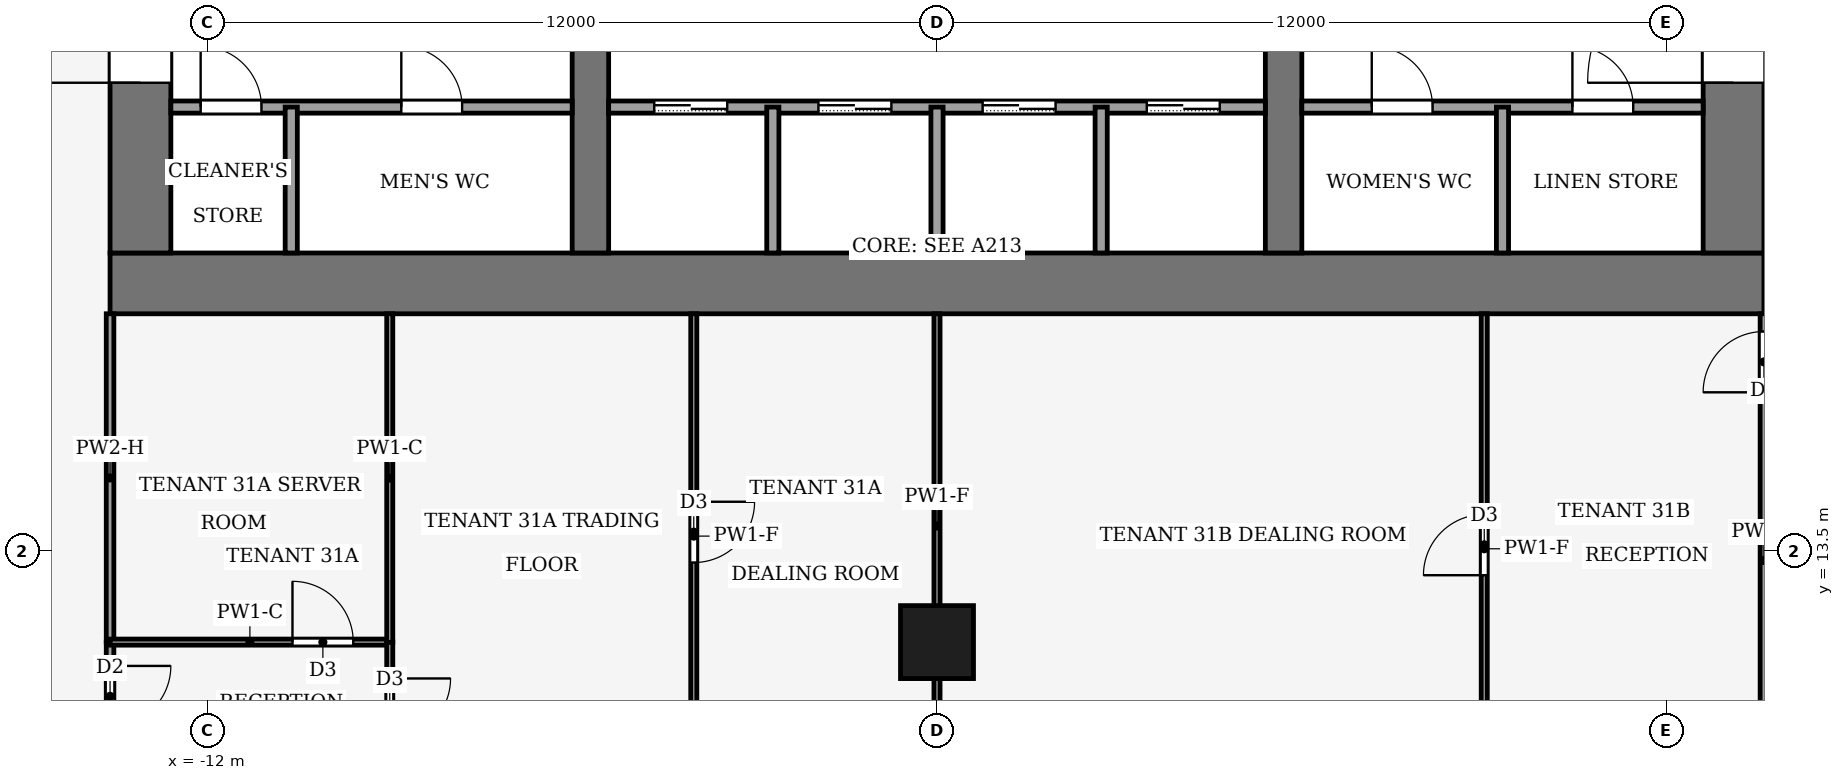
"""IFC4 building model, lengths in metres.
Left out: names, types, materials, properties, quantities, classifications, styles, units other than length and angle.
Written with IfcOpenShell. Run it as: python <this file> out.ifc"""

import sys

from ifc_helpers import new_model, si_unit, direction, frame, frame_2d, origin, origin_2d, place, context, subcontext, project, spatial, rectangle, hollow_rectangle, extrude, element, fill, save


model = new_model("IFC4")
c1 = context("Model", 3, precision=1e-05, world=origin(), true_north=direction((0.0, 1.0)))
c2 = subcontext(c1, "Body", "Model", "MODEL_VIEW")
j1 = project(units=[si_unit("LENGTHUNIT", "METRE"), si_unit("PLANEANGLEUNIT", "RADIAN")], contexts=[c1])
p1 = place(None, origin())
s1 = spatial("IfcSite", under=j1, at=p1, CompositionType="ELEMENT")
p2 = place(p1, origin())
s2 = spatial("IfcBuilding", under=s1, at=p2, CompositionType="ELEMENT")
p3 = place(p2, frame((0.0, 0.0, 138.0)))
s3 = spatial("IfcBuildingStorey", under=s2, at=p3, CompositionType="ELEMENT", Elevation=138.0)
p4 = place(p3, frame((-13.6, 17.9, -0.13), z_axis=(0.0, 0.0, 1.0), x_axis=(1.0, 0.0, 0.0)))
e1 = element("IfcWall", 1, at=p4, inside=s3, PredefinedType="SHEAR", context=c2, shape_type="SweptSolid", body=[
    extrude(rectangle(XDim=27.2, YDim=1.0, at=frame_2d((13.6, 0.0))), origin(), (0.0, 0.0, 1.0), 4.0),
])
p5 = place(p3, frame((-13.1, 18.4, -0.13), z_axis=(0.0, 0.0, 1.0), x_axis=(0.0, 1.0, 0.0)))
e2 = element("IfcWall", 2, at=p5, inside=s3, PredefinedType="SHEAR", context=c2, shape_type="SweptSolid", body=[
    extrude(rectangle(XDim=19.2, YDim=1.0, at=frame_2d((9.6, 0.0))), origin(), (0.0, 0.0, 1.0), 4.0),
])
p6 = place(p5, frame((2.8, 0.0, 0.13)))
e3 = element("IfcOpeningElement", 3, at=p6, cuts=e2, PredefinedType="OPENING", context=c2, shape_type="SweptSolid", body=[
    extrude(rectangle(XDim=2.4, YDim=2.4, at=frame_2d((1.2, 1.2))), frame((0.0, 0.51, 0.0), z_axis=(0.0, -1.0, 0.0), x_axis=(1.0, 0.0, 0.0)), (0.0, 0.0, 1.0), 1.02),
])
p7 = place(p5, frame((13.4, 0.0, 0.13)))
e4 = element("IfcOpeningElement", 4, at=p7, cuts=e2, PredefinedType="OPENING", context=c2, shape_type="SweptSolid", body=[
    extrude(rectangle(XDim=1.4, YDim=2.2, at=frame_2d((0.7, 1.1))), frame((0.0, 0.51, 0.0), z_axis=(0.0, -1.0, 0.0), x_axis=(1.0, 0.0, 0.0)), (0.0, 0.0, 1.0), 1.02),
])
p8 = place(p3, frame((13.1, 18.4, -0.13), z_axis=(0.0, 0.0, 1.0), x_axis=(0.0, 1.0, 0.0)))
e5 = element("IfcWall", 5, at=p8, inside=s3, PredefinedType="SHEAR", context=c2, shape_type="SweptSolid", body=[
    extrude(rectangle(XDim=19.2, YDim=1.0, at=frame_2d((9.6, 0.0))), origin(), (0.0, 0.0, 1.0), 4.0),
])
p9 = place(p8, frame((2.8, 0.0, 0.13)))
e6 = element("IfcOpeningElement", 6, at=p9, cuts=e5, PredefinedType="OPENING", context=c2, shape_type="SweptSolid", body=[
    extrude(rectangle(XDim=2.4, YDim=2.4, at=frame_2d((1.2, 1.2))), frame((0.0, 0.51, 0.0), z_axis=(0.0, -1.0, 0.0), x_axis=(1.0, 0.0, 0.0)), (0.0, 0.0, 1.0), 1.02),
])
p10 = place(p8, frame((13.3, 0.0, 0.13)))
e7 = element("IfcOpeningElement", 7, at=p10, cuts=e5, PredefinedType="OPENING", context=c2, shape_type="SweptSolid", body=[
    extrude(rectangle(XDim=2.4, YDim=2.4, at=frame_2d((1.2, 1.2))), frame((0.0, 0.51, 0.0), z_axis=(0.0, -1.0, 0.0), x_axis=(1.0, 0.0, 0.0)), (0.0, 0.0, 1.0), 1.02),
])
p11 = place(p3, frame((-5.7, 18.4, -0.13), z_axis=(0.0, 0.0, 1.0), x_axis=(0.0, 1.0, 0.0)))
e8 = element("IfcWall", 8, at=p11, inside=s3, PredefinedType="SHEAR", context=c2, shape_type="SweptSolid", body=[
    extrude(rectangle(XDim=19.2, YDim=0.6, at=frame_2d((9.6, 0.0))), origin(), (0.0, 0.0, 1.0), 4.0),
])
p12 = place(p11, frame((8.35, 0.0, 0.13)))
e9 = element("IfcOpeningElement", 9, at=p12, cuts=e8, PredefinedType="OPENING", context=c2, shape_type="SweptSolid", body=[
    extrude(rectangle(XDim=0.9, YDim=2.1, at=frame_2d((0.45, 1.05))), frame((0.0, 0.31, 0.0), z_axis=(0.0, -1.0, 0.0), x_axis=(1.0, 0.0, 0.0)), (0.0, 0.0, 1.0), 0.62),
])
p13 = place(p3, frame((5.7, 18.4, -0.13), z_axis=(0.0, 0.0, 1.0), x_axis=(0.0, 1.0, 0.0)))
e10 = element("IfcWall", 10, at=p13, inside=s3, PredefinedType="SHEAR", context=c2, shape_type="SweptSolid", body=[
    extrude(rectangle(XDim=19.2, YDim=0.6, at=frame_2d((9.6, 0.0))), origin(), (0.0, 0.0, 1.0), 4.0),
])
p14 = place(p13, frame((13.3, 0.0, 0.13)))
e11 = element("IfcOpeningElement", 11, at=p14, cuts=e10, PredefinedType="OPENING", context=c2, shape_type="SweptSolid", body=[
    extrude(rectangle(XDim=2.4, YDim=2.4, at=frame_2d((1.2, 1.2))), frame((0.0, 0.31, 0.0), z_axis=(0.0, -1.0, 0.0), x_axis=(1.0, 0.0, 0.0)), (0.0, 0.0, 1.0), 0.62),
])
p15 = place(p3, frame((0.0, 12.0, 0.0), z_axis=(0.0, 0.0, 1.0), x_axis=(1.0, 0.0, 0.0)))
e12 = element("IfcColumn", 12, at=p15, inside=s3, PredefinedType="COLUMN", context=c2, shape_type="SweptSolid", body=[
    extrude(hollow_rectangle(XDim=1.2, YDim=1.2, WallThickness=0.07, at=origin_2d()), origin(), (0.0, 0.0, 1.0), 4.0),
])
p16 = place(p3, frame((-12.6, 20.8, 0.0), z_axis=(0.0, 0.0, 1.0), x_axis=(1.0, 0.0, 0.0)))
e13 = element("IfcWall", 13, at=p16, inside=s3, PredefinedType="PARTITIONING", context=c2, shape_type="SweptSolid", body=[
    extrude(rectangle(XDim=6.6, YDim=0.2, at=frame_2d((3.3, 0.0))), origin(), (0.0, 0.0, 1.0), 3.87),
])
p17 = place(p16, frame((0.49, 0.0, 0.0)))
e14 = element("IfcOpeningElement", 14, at=p17, cuts=e13, PredefinedType="OPENING", context=c2, shape_type="SweptSolid", body=[
    extrude(rectangle(XDim=1.0, YDim=2.1, at=frame_2d((0.5, 1.05))), frame((0.0, 0.11, 0.0), z_axis=(0.0, -1.0, 0.0), x_axis=(1.0, 0.0, 0.0)), (0.0, 0.0, 1.0), 0.22),
])
p18 = place(p16, frame((3.79, 0.0, 0.0)))
e15 = element("IfcOpeningElement", 15, at=p18, cuts=e13, PredefinedType="OPENING", context=c2, shape_type="SweptSolid", body=[
    extrude(rectangle(XDim=1.0, YDim=2.1, at=frame_2d((0.5, 1.05))), frame((0.0, 0.11, 0.0), z_axis=(0.0, -1.0, 0.0), x_axis=(1.0, 0.0, 0.0)), (0.0, 0.0, 1.0), 0.22),
])
p19 = place(p3, frame((-5.4, 20.8, 0.0), z_axis=(0.0, 0.0, 1.0), x_axis=(1.0, 0.0, 0.0)))
e16 = element("IfcWall", 16, at=p19, inside=s3, PredefinedType="PARTITIONING", context=c2, shape_type="SweptSolid", body=[
    extrude(rectangle(XDim=10.8, YDim=0.2, at=frame_2d((5.4, 0.0))), origin(), (0.0, 0.0, 1.0), 3.87),
])
p20 = place(p19, frame((0.75, 0.0, 0.0)))
e17 = element("IfcOpeningElement", 17, at=p20, cuts=e16, PredefinedType="OPENING", context=c2, shape_type="SweptSolid", body=[
    extrude(rectangle(XDim=1.2, YDim=2.2, at=frame_2d((0.6, 1.1))), frame((0.0, 0.11, 0.0), z_axis=(0.0, -1.0, 0.0), x_axis=(1.0, 0.0, 0.0)), (0.0, 0.0, 1.0), 0.22),
])
p21 = place(p19, frame((3.45, 0.0, 0.0)))
e18 = element("IfcOpeningElement", 18, at=p21, cuts=e16, PredefinedType="OPENING", context=c2, shape_type="SweptSolid", body=[
    extrude(rectangle(XDim=1.2, YDim=2.2, at=frame_2d((0.6, 1.1))), frame((0.0, 0.11, 0.0), z_axis=(0.0, -1.0, 0.0), x_axis=(1.0, 0.0, 0.0)), (0.0, 0.0, 1.0), 0.22),
])
p22 = place(p19, frame((6.15, 0.0, 0.0)))
e19 = element("IfcOpeningElement", 19, at=p22, cuts=e16, PredefinedType="OPENING", context=c2, shape_type="SweptSolid", body=[
    extrude(rectangle(XDim=1.2, YDim=2.2, at=frame_2d((0.6, 1.1))), frame((0.0, 0.11, 0.0), z_axis=(0.0, -1.0, 0.0), x_axis=(1.0, 0.0, 0.0)), (0.0, 0.0, 1.0), 0.22),
])
p23 = place(p19, frame((8.85, 0.0, 0.0)))
e20 = element("IfcOpeningElement", 20, at=p23, cuts=e16, PredefinedType="OPENING", context=c2, shape_type="SweptSolid", body=[
    extrude(rectangle(XDim=1.2, YDim=2.2, at=frame_2d((0.6, 1.1))), frame((0.0, 0.11, 0.0), z_axis=(0.0, -1.0, 0.0), x_axis=(1.0, 0.0, 0.0)), (0.0, 0.0, 1.0), 0.22),
])
p24 = place(p3, frame((6.0, 20.8, 0.0), z_axis=(0.0, 0.0, 1.0), x_axis=(1.0, 0.0, 0.0)))
e21 = element("IfcWall", 21, at=p24, inside=s3, PredefinedType="PARTITIONING", context=c2, shape_type="SweptSolid", body=[
    extrude(rectangle(XDim=6.6, YDim=0.2, at=frame_2d((3.3, 0.0))), origin(), (0.0, 0.0, 1.0), 3.87),
])
p25 = place(p24, frame((1.15, 0.0, 0.0)))
e22 = element("IfcOpeningElement", 22, at=p25, cuts=e21, PredefinedType="OPENING", context=c2, shape_type="SweptSolid", body=[
    extrude(rectangle(XDim=1.0, YDim=2.1, at=frame_2d((0.5, 1.05))), frame((0.0, 0.11, 0.0), z_axis=(0.0, -1.0, 0.0), x_axis=(1.0, 0.0, 0.0)), (0.0, 0.0, 1.0), 0.22),
])
p26 = place(p24, frame((4.45, 0.0, 0.0)))
e23 = element("IfcOpeningElement", 23, at=p26, cuts=e21, PredefinedType="OPENING", context=c2, shape_type="SweptSolid", body=[
    extrude(rectangle(XDim=1.0, YDim=2.1, at=frame_2d((0.5, 1.05))), frame((0.0, 0.11, 0.0), z_axis=(0.0, -1.0, 0.0), x_axis=(1.0, 0.0, 0.0)), (0.0, 0.0, 1.0), 0.22),
])
for number, where, z_axis, x_axis in (
    (24, (-10.62, 18.4, 0.0), (0.0, 0.0, 1.0), (0.0, 1.0, 0.0)),
    (25, (-2.7, 18.4, 0.0), (0.0, 0.0, 1.0), (0.0, 1.0, 0.0)),
    (26, (0.0, 18.4, 0.0), (0.0, 0.0, 1.0), (0.0, 1.0, 0.0)),
    (27, (2.7, 18.4, 0.0), (0.0, 0.0, 1.0), (0.0, 1.0, 0.0)),
    (28, (9.3, 18.4, 0.0), (0.0, 0.0, 1.0), (0.0, 1.0, 0.0)),
):
    element("IfcWall", number, at=place(p3, frame(where, z_axis=z_axis, x_axis=x_axis)), inside=s3, PredefinedType="PARTITIONING", context=c2, shape_type="SweptSolid", body=[
        extrude(rectangle(XDim=2.4, YDim=0.2, at=frame_2d((1.2, 0.0))), origin(), (0.0, 0.0, 1.0), 3.87),
    ])
p27 = place(p3, frame((-13.6, 12.0, 0.0), z_axis=(0.0, 0.0, 1.0), x_axis=(0.0, -1.0, 0.0)))
e29 = element("IfcWall", 29, at=p27, inside=s3, PredefinedType="PARTITIONING", context=c2, shape_type="SweptSolid", body=[
    extrude(rectangle(XDim=2.713, YDim=0.125, at=frame_2d((1.357, 0.0))), origin(), (0.0, 0.0, 1.0), 3.04),
])
p28 = place(p27, frame((0.392, 0.0, 0.0)))
e30 = element("IfcOpeningElement", 30, at=p28, cuts=e29, PredefinedType="OPENING", context=c2, shape_type="SweptSolid", body=[
    extrude(rectangle(XDim=1.0, YDim=2.1, at=frame_2d((0.5, 1.05))), frame((0.0, 0.073, 0.0), z_axis=(0.0, -1.0, 0.0), x_axis=(1.0, 0.0, 0.0)), (0.0, 0.0, 1.0), 0.145),
])
p29 = place(p3, frame((-13.6, 12.0, 0.0), z_axis=(0.0, 0.0, 1.0), x_axis=(0.0, 1.0, 0.0)))
e31 = element("IfcWall", 31, at=p29, inside=s3, PredefinedType="PARTITIONING", context=c2, shape_type="SweptSolid", body=[
    extrude(rectangle(XDim=5.4, YDim=0.125, at=frame_2d((2.7, 0.0))), origin(), (0.0, 0.0, 1.0), 3.14),
])
p30 = place(p3, frame((13.6, 9.287, 0.0), z_axis=(0.0, 0.0, 1.0), x_axis=(0.0, 1.0, 0.0)))
e32 = element("IfcWall", 32, at=p30, inside=s3, PredefinedType="PARTITIONING", context=c2, shape_type="SweptSolid", body=[
    extrude(rectangle(XDim=8.113, YDim=0.125, at=frame_2d((4.057, 0.0))), origin(), (0.0, 0.0, 1.0), 3.04),
])
p31 = place(p30, frame((6.822, 0.0, 0.0)))
e33 = element("IfcOpeningElement", 33, at=p31, cuts=e32, PredefinedType="OPENING", context=c2, shape_type="SweptSolid", body=[
    extrude(rectangle(XDim=1.0, YDim=2.1, at=frame_2d((0.5, 1.05))), frame((0.0, 0.073, 0.0), z_axis=(0.0, -1.0, 0.0), x_axis=(1.0, 0.0, 0.0)), (0.0, 0.0, 1.0), 0.145),
])
p32 = place(p3, frame((-13.6, 12.0, 0.0), z_axis=(0.0, 0.0, 1.0), x_axis=(1.0, 0.0, 0.0)))
e34 = element("IfcWall", 34, at=p32, inside=s3, PredefinedType="PARTITIONING", context=c2, shape_type="SweptSolid", body=[
    extrude(rectangle(XDim=4.6, YDim=0.1, at=frame_2d((2.3, 0.0))), origin(), (0.0, 0.0, 1.0), 3.87),
])
p33 = place(p32, frame((3.0, 0.0, 0.0)))
e35 = element("IfcOpeningElement", 35, at=p33, cuts=e34, PredefinedType="OPENING", context=c2, shape_type="SweptSolid", body=[
    extrude(rectangle(XDim=1.0, YDim=2.1, at=frame_2d((0.5, 1.05))), frame((0.0, 0.06, 0.0), z_axis=(0.0, -1.0, 0.0), x_axis=(1.0, 0.0, 0.0)), (0.0, 0.0, 1.0), 0.12),
])
p34 = place(p3, frame((-9.0, 12.004, 0.0), z_axis=(0.0, 0.0, 1.0), x_axis=(0.0, -1.0, 0.0)))
e36 = element("IfcWall", 36, at=p34, inside=s3, PredefinedType="PARTITIONING", context=c2, shape_type="SweptSolid", body=[
    extrude(rectangle(XDim=2.334, YDim=0.1, at=frame_2d((1.167, 0.0))), origin(), (0.0, 0.0, 1.0), 3.04),
])
p35 = place(p34, frame((0.602, 0.0, 0.0)))
e37 = element("IfcOpeningElement", 37, at=p35, cuts=e36, PredefinedType="OPENING", context=c2, shape_type="SweptSolid", body=[
    extrude(rectangle(XDim=1.0, YDim=2.1, at=frame_2d((0.5, 1.05))), frame((0.0, 0.06, 0.0), z_axis=(0.0, -1.0, 0.0), x_axis=(1.0, 0.0, 0.0)), (0.0, 0.0, 1.0), 0.12),
])
p36 = place(p3, frame((-9.0, 11.996, 0.0), z_axis=(0.0, 0.0, 1.0), x_axis=(0.0, 1.0, 0.0)))
e38 = element("IfcWall", 38, at=p36, inside=s3, PredefinedType="PARTITIONING", context=c2, shape_type="SweptSolid", body=[
    extrude(rectangle(XDim=5.404, YDim=0.1, at=frame_2d((2.702, 0.0))), origin(), (0.0, 0.0, 1.0), 3.87),
])
p37 = place(p3, frame((-4.0, 17.4, 0.0), z_axis=(0.0, 0.0, 1.0), x_axis=(0.0, -1.0, 0.0)))
e39 = element("IfcWall", 39, at=p37, inside=s3, PredefinedType="PARTITIONING", context=c2, shape_type="SweptSolid", body=[
    extrude(rectangle(XDim=7.313, YDim=0.1, at=frame_2d((3.657, 0.0))), origin(), (0.0, 0.0, 1.0), 3.04),
])
p38 = place(p37, frame((3.092, 0.0, 0.0)))
e40 = element("IfcOpeningElement", 40, at=p38, cuts=e39, PredefinedType="OPENING", context=c2, shape_type="SweptSolid", body=[
    extrude(rectangle(XDim=1.0, YDim=2.1, at=frame_2d((0.5, 1.05))), frame((0.0, 0.06, 0.0), z_axis=(0.0, -1.0, 0.0), x_axis=(1.0, 0.0, 0.0)), (0.0, 0.0, 1.0), 0.12),
])
p39 = place(p3, frame((0.0, 10.42, 0.0), z_axis=(0.0, 0.0, 1.0), x_axis=(0.0, 1.0, 0.0)))
e41 = element("IfcWall", 41, at=p39, inside=s3, PredefinedType="PARTITIONING", context=c2, shape_type="SweptSolid", body=[
    extrude(rectangle(XDim=6.98, YDim=0.1, at=frame_2d((3.49, 0.0))), origin(), (0.0, 0.0, 1.0), 3.04),
])
p40 = place(p3, frame((9.0, 9.67, 0.0), z_axis=(0.0, 0.0, 1.0), x_axis=(0.0, 1.0, 0.0)))
e42 = element("IfcWall", 42, at=p40, inside=s3, PredefinedType="PARTITIONING", context=c2, shape_type="SweptSolid", body=[
    extrude(rectangle(XDim=7.73, YDim=0.1, at=frame_2d((3.865, 0.0))), origin(), (0.0, 0.0, 1.0), 3.04),
])
p41 = place(p40, frame((3.43, 0.0, 0.0)))
e43 = element("IfcOpeningElement", 43, at=p41, cuts=e42, PredefinedType="OPENING", context=c2, shape_type="SweptSolid", body=[
    extrude(rectangle(XDim=1.0, YDim=2.1, at=frame_2d((0.5, 1.05))), frame((0.0, 0.06, 0.0), z_axis=(0.0, -1.0, 0.0), x_axis=(1.0, 0.0, 0.0)), (0.0, 0.0, 1.0), 0.12),
])
p42 = place(p20, origin())
e44 = element("IfcDoor", 44, at=p42, inside=s3, OperationType="SLIDING_TO_LEFT", PredefinedType="DOOR", context=c2, shape_type="SweptSolid", body=[
    extrude(rectangle(XDim=1.2, YDim=2.2, at=frame_2d((0.6, 1.1))), frame((0.0, 0.025, 0.0), z_axis=(0.0, -1.0, 0.0), x_axis=(1.0, 0.0, 0.0)), (0.0, 0.0, 1.0), 0.05),
])
fill(e17, e44)
p43 = place(p21, origin())
e45 = element("IfcDoor", 45, at=p43, inside=s3, OperationType="SLIDING_TO_LEFT", PredefinedType="DOOR", context=c2, shape_type="SweptSolid", body=[
    extrude(rectangle(XDim=1.2, YDim=2.2, at=frame_2d((0.6, 1.1))), frame((0.0, 0.025, 0.0), z_axis=(0.0, -1.0, 0.0), x_axis=(1.0, 0.0, 0.0)), (0.0, 0.0, 1.0), 0.05),
])
fill(e18, e45)
p44 = place(p22, origin())
e46 = element("IfcDoor", 46, at=p44, inside=s3, OperationType="SLIDING_TO_LEFT", PredefinedType="DOOR", context=c2, shape_type="SweptSolid", body=[
    extrude(rectangle(XDim=1.2, YDim=2.2, at=frame_2d((0.6, 1.1))), frame((0.0, 0.025, 0.0), z_axis=(0.0, -1.0, 0.0), x_axis=(1.0, 0.0, 0.0)), (0.0, 0.0, 1.0), 0.05),
])
fill(e19, e46)
p45 = place(p23, origin())
e47 = element("IfcDoor", 47, at=p45, inside=s3, OperationType="SLIDING_TO_LEFT", PredefinedType="DOOR", context=c2, shape_type="SweptSolid", body=[
    extrude(rectangle(XDim=1.2, YDim=2.2, at=frame_2d((0.6, 1.1))), frame((0.0, 0.025, 0.0), z_axis=(0.0, -1.0, 0.0), x_axis=(1.0, 0.0, 0.0)), (0.0, 0.0, 1.0), 0.05),
])
fill(e20, e47)
p46 = place(p17, origin())
e48 = element("IfcDoor", 48, at=p46, inside=s3, OperationType="SINGLE_SWING_RIGHT", PredefinedType="DOOR", context=c2, shape_type="SweptSolid", body=[
    extrude(rectangle(XDim=1.0, YDim=2.1, at=frame_2d((0.5, 1.05))), frame((0.0, 0.025, 0.0), z_axis=(0.0, -1.0, 0.0), x_axis=(1.0, 0.0, 0.0)), (0.0, 0.0, 1.0), 0.05),
])
fill(e14, e48)
p47 = place(p18, origin())
e49 = element("IfcDoor", 49, at=p47, inside=s3, OperationType="SINGLE_SWING_RIGHT", PredefinedType="DOOR", context=c2, shape_type="SweptSolid", body=[
    extrude(rectangle(XDim=1.0, YDim=2.1, at=frame_2d((0.5, 1.05))), frame((0.0, 0.025, 0.0), z_axis=(0.0, -1.0, 0.0), x_axis=(1.0, 0.0, 0.0)), (0.0, 0.0, 1.0), 0.05),
])
fill(e15, e49)
p48 = place(p25, origin())
e50 = element("IfcDoor", 50, at=p48, inside=s3, OperationType="SINGLE_SWING_LEFT", PredefinedType="DOOR", context=c2, shape_type="SweptSolid", body=[
    extrude(rectangle(XDim=1.0, YDim=2.1, at=frame_2d((0.5, 1.05))), frame((0.0, 0.025, 0.0), z_axis=(0.0, -1.0, 0.0), x_axis=(1.0, 0.0, 0.0)), (0.0, 0.0, 1.0), 0.05),
])
fill(e22, e50)
p49 = place(p26, origin())
e51 = element("IfcDoor", 51, at=p49, inside=s3, OperationType="SINGLE_SWING_LEFT", PredefinedType="DOOR", context=c2, shape_type="SweptSolid", body=[
    extrude(rectangle(XDim=1.0, YDim=2.1, at=frame_2d((0.5, 1.05))), frame((0.0, 0.025, 0.0), z_axis=(0.0, -1.0, 0.0), x_axis=(1.0, 0.0, 0.0)), (0.0, 0.0, 1.0), 0.05),
])
fill(e23, e51)
p50 = place(p6, origin())
e52 = element("IfcDoor", 52, at=p50, inside=s3, OperationType="DOUBLE_DOOR_SINGLE_SWING", PredefinedType="DOOR", context=c2, shape_type="SweptSolid", body=[
    extrude(rectangle(XDim=2.4, YDim=2.4, at=frame_2d((1.2, 1.2))), frame((0.0, 0.025, 0.0), z_axis=(0.0, -1.0, 0.0), x_axis=(1.0, 0.0, 0.0)), (0.0, 0.0, 1.0), 0.05),
])
fill(e3, e52)
p51 = place(p9, origin())
e53 = element("IfcDoor", 53, at=p51, inside=s3, OperationType="DOUBLE_DOOR_SINGLE_SWING", PredefinedType="DOOR", context=c2, shape_type="SweptSolid", body=[
    extrude(rectangle(XDim=2.4, YDim=2.4, at=frame_2d((1.2, 1.2))), frame((0.0, 0.025, 0.0), z_axis=(0.0, -1.0, 0.0), x_axis=(1.0, 0.0, 0.0)), (0.0, 0.0, 1.0), 0.05),
])
fill(e6, e53)
p52 = place(p28, origin())
e54 = element("IfcDoor", 54, at=p52, inside=s3, OperationType="SINGLE_SWING_LEFT", PredefinedType="DOOR", context=c2, shape_type="SweptSolid", body=[
    extrude(rectangle(XDim=1.0, YDim=2.1, at=frame_2d((0.5, 1.05))), frame((0.0, 0.025, 0.0), z_axis=(0.0, -1.0, 0.0), x_axis=(1.0, 0.0, 0.0)), (0.0, 0.0, 1.0), 0.05),
])
fill(e30, e54)
p53 = place(p31, origin())
e55 = element("IfcDoor", 55, at=p53, inside=s3, OperationType="SINGLE_SWING_RIGHT", PredefinedType="DOOR", context=c2, shape_type="SweptSolid", body=[
    extrude(rectangle(XDim=1.0, YDim=2.1, at=frame_2d((0.5, 1.05))), frame((0.0, 0.025, 0.0), z_axis=(0.0, -1.0, 0.0), x_axis=(1.0, 0.0, 0.0)), (0.0, 0.0, 1.0), 0.05),
])
fill(e33, e55)
p54 = place(p33, origin())
e56 = element("IfcDoor", 56, at=p54, inside=s3, OperationType="SINGLE_SWING_RIGHT", PredefinedType="DOOR", context=c2, shape_type="SweptSolid", body=[
    extrude(rectangle(XDim=1.0, YDim=2.1, at=frame_2d((0.5, 1.05))), frame((0.0, 0.025, 0.0), z_axis=(0.0, -1.0, 0.0), x_axis=(1.0, 0.0, 0.0)), (0.0, 0.0, 1.0), 0.05),
])
fill(e35, e56)
p55 = place(p35, origin())
e57 = element("IfcDoor", 57, at=p55, inside=s3, OperationType="SINGLE_SWING_LEFT", PredefinedType="DOOR", context=c2, shape_type="SweptSolid", body=[
    extrude(rectangle(XDim=1.0, YDim=2.1, at=frame_2d((0.5, 1.05))), frame((0.0, 0.025, 0.0), z_axis=(0.0, -1.0, 0.0), x_axis=(1.0, 0.0, 0.0)), (0.0, 0.0, 1.0), 0.05),
])
fill(e37, e57)
p56 = place(p38, origin())
e58 = element("IfcDoor", 58, at=p56, inside=s3, OperationType="SINGLE_SWING_LEFT", PredefinedType="DOOR", context=c2, shape_type="SweptSolid", body=[
    extrude(rectangle(XDim=1.0, YDim=2.1, at=frame_2d((0.5, 1.05))), frame((0.0, 0.025, 0.0), z_axis=(0.0, -1.0, 0.0), x_axis=(1.0, 0.0, 0.0)), (0.0, 0.0, 1.0), 0.05),
])
fill(e40, e58)
p57 = place(p41, origin())
e59 = element("IfcDoor", 59, at=p57, inside=s3, OperationType="SINGLE_SWING_RIGHT", PredefinedType="DOOR", context=c2, shape_type="SweptSolid", body=[
    extrude(rectangle(XDim=1.0, YDim=2.1, at=frame_2d((0.5, 1.05))), frame((0.0, 0.025, 0.0), z_axis=(0.0, -1.0, 0.0), x_axis=(1.0, 0.0, 0.0)), (0.0, 0.0, 1.0), 0.05),
])
fill(e43, e59)
save(model, sys.argv[1])
